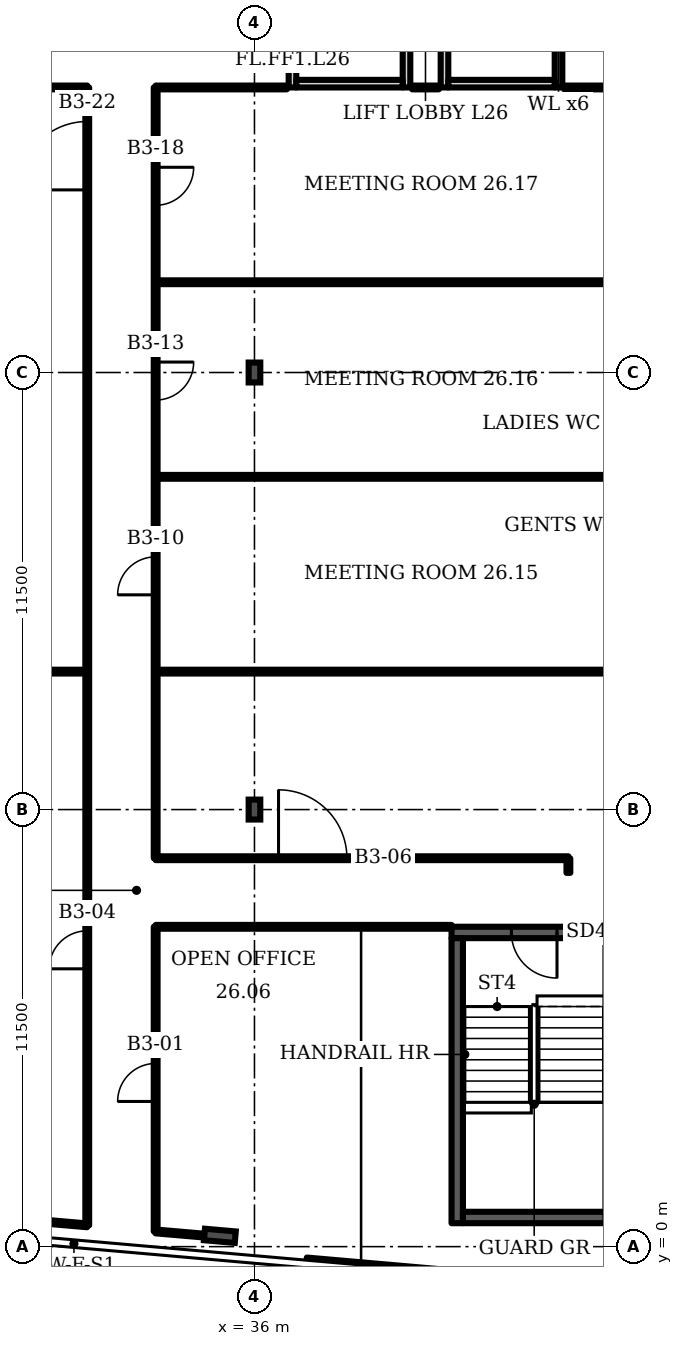
"""IFC4 building model, lengths in metres.
Left out: names, types, materials, properties, quantities, classifications, styles, units other than length and angle.
Written with IfcOpenShell. Run it as: python <this file> out.ifc"""

import sys

from ifc_helpers import new_model, si_unit, direction, frame, frame_2d, origin, origin_2d, place, context, subcontext, project, spatial, rectangle, i_section, extrude, element, fill, save


model = new_model("IFC4")
c1 = context("Model", 3, precision=1e-05, world=origin(), true_north=direction((0.0, 1.0)))
c2 = subcontext(c1, "Body", "Model", "MODEL_VIEW")
j1 = project(units=[si_unit("LENGTHUNIT", "METRE"), si_unit("PLANEANGLEUNIT", "RADIAN")], contexts=[c1])
p1 = place(None, origin())
s1 = spatial("IfcSite", under=j1, at=p1, CompositionType="ELEMENT")
p2 = place(p1, origin())
s2 = spatial("IfcBuilding", under=s1, at=p2, CompositionType="ELEMENT")
p3 = place(p2, frame((0.0, 0.0, 114.7)))
s3 = spatial("IfcBuildingStorey", under=s2, at=p3, CompositionType="ELEMENT", Elevation=114.7)
p4 = place(p3, frame((35.089, 0.285, 0.0), z_axis=(0.0, 0.0, 1.0), x_axis=(-0.087156, -0.996198, 0.0)))
e1 = element("IfcColumn", 1, at=p4, inside=s3, PredefinedType="COLUMN", context=c2, shape_type="SweptSolid", body=[
    extrude(i_section(OverallWidth=0.303, OverallDepth=0.814, WebThickness=0.021, FlangeThickness=0.04, FilletRadius=0.03, at=origin_2d()), origin(), (0.0, 0.0, 1.0), 3.6),
])
for number, where, z_axis, x_axis in (
    (2, (36.0, 11.5, 0.0), (0.0, 0.0, 1.0), (1.0, 0.0, 0.0)),
    (3, (36.0, 23.0, 0.0), (0.0, 0.0, 1.0), (1.0, 0.0, 0.0)),
):
    element("IfcColumn", number, at=place(p3, frame(where, z_axis=z_axis, x_axis=x_axis)), inside=s3, PredefinedType="COLUMN", context=c2, shape_type="SweptSolid", body=[
        extrude(i_section(OverallWidth=0.306, OverallDepth=0.524, WebThickness=0.021, FlangeThickness=0.04, FilletRadius=0.027, at=origin_2d()), origin(), (0.0, 0.0, 1.0), 3.6),
    ])
p5 = place(p3, frame((37.363, -0.461, 0.0), z_axis=(0.0, 0.0, 1.0), x_axis=(0.996194, -0.087159, 0.0)))
e4 = element("IfcWall", 4, at=p5, inside=s3, PredefinedType="SOLIDWALL", context=c2, shape_type="SweptSolid", body=[
    extrude(rectangle(XDim=12.199, YDim=0.35, at=frame_2d((6.099, 0.0))), origin(), (0.0, 0.0, 1.0), 1.0),
])
p6 = place(p3, frame((37.0, 30.5, 0.0), z_axis=(0.0, 0.0, 1.0), x_axis=(0.0, 1.0, 0.0)))
e5 = element("IfcWall", 5, at=p6, inside=s3, PredefinedType="PARTITIONING", context=c2, shape_type="SweptSolid", body=[
    extrude(rectangle(XDim=3.5, YDim=0.2, at=frame_2d((1.75, 0.0))), origin(), (0.0, 0.0, 1.0), 3.2),
])
p7 = place(p6, frame((1.2, 0.0, 0.0)))
e6 = element("IfcOpeningElement", 6, at=p7, cuts=e5, PredefinedType="OPENING", context=c2, shape_type="SweptSolid", body=[
    extrude(rectangle(XDim=1.1, YDim=2.1, at=frame_2d((0.55, 1.05))), frame((0.0, 0.11, 0.0), z_axis=(0.0, -1.0, 0.0), x_axis=(1.0, 0.0, 0.0)), (0.0, 0.0, 1.0), 0.22),
])
p8 = place(p3, frame((40.0, 30.5, 0.0), z_axis=(0.0, 0.0, 1.0), x_axis=(0.0, 1.0, 0.0)))
e7 = element("IfcWall", 7, at=p8, inside=s3, PredefinedType="PARTITIONING", context=c2, shape_type="SweptSolid", body=[
    extrude(rectangle(XDim=3.5, YDim=0.2, at=frame_2d((1.75, 0.0))), origin(), (0.0, 0.0, 1.0), 3.2),
])
p9 = place(p3, frame((37.1, 30.6, 0.0), z_axis=(0.0, 0.0, 1.0), x_axis=(1.0, 0.0, 0.0)))
e8 = element("IfcWall", 8, at=p9, inside=s3, PredefinedType="PARTITIONING", context=c2, shape_type="SweptSolid", body=[
    extrude(rectangle(XDim=2.8, YDim=0.2, at=frame_2d((1.4, 0.0))), origin(), (0.0, 0.0, 1.0), 3.2),
])
p10 = place(p3, frame((41.0, 30.5, 0.0), z_axis=(0.0, 0.0, 1.0), x_axis=(0.0, 1.0, 0.0)))
e9 = element("IfcWall", 9, at=p10, inside=s3, PredefinedType="PARTITIONING", context=c2, shape_type="SweptSolid", body=[
    extrude(rectangle(XDim=3.5, YDim=0.2, at=frame_2d((1.75, 0.0))), origin(), (0.0, 0.0, 1.0), 3.2),
])
p11 = place(p3, frame((44.0, 30.5, 0.0), z_axis=(0.0, 0.0, 1.0), x_axis=(0.0, 1.0, 0.0)))
e10 = element("IfcWall", 10, at=p11, inside=s3, PredefinedType="PARTITIONING", context=c2, shape_type="SweptSolid", body=[
    extrude(rectangle(XDim=3.5, YDim=0.2, at=frame_2d((1.75, 0.0))), origin(), (0.0, 0.0, 1.0), 3.2),
])
p12 = place(p11, frame((1.2, 0.0, 0.0)))
e11 = element("IfcOpeningElement", 11, at=p12, cuts=e10, PredefinedType="OPENING", context=c2, shape_type="SweptSolid", body=[
    extrude(rectangle(XDim=1.1, YDim=2.1, at=frame_2d((0.55, 1.05))), frame((0.0, 0.11, 0.0), z_axis=(0.0, -1.0, 0.0), x_axis=(1.0, 0.0, 0.0)), (0.0, 0.0, 1.0), 0.22),
])
p13 = place(p3, frame((41.1, 30.6, 0.0), z_axis=(0.0, 0.0, 1.0), x_axis=(1.0, 0.0, 0.0)))
e12 = element("IfcWall", 12, at=p13, inside=s3, PredefinedType="PARTITIONING", context=c2, shape_type="SweptSolid", body=[
    extrude(rectangle(XDim=2.8, YDim=0.2, at=frame_2d((1.4, 0.0))), origin(), (0.0, 0.0, 1.0), 3.2),
])
p14 = place(p3, frame((41.185, 8.267, 0.0), z_axis=(0.0, 0.0, 1.0), x_axis=(1.0, 0.0, 0.0)))
e13 = element("IfcWall", 13, at=p14, inside=s3, PredefinedType="SHEAR", context=c2, shape_type="SweptSolid", body=[
    extrude(rectangle(XDim=4.35, YDim=0.3, at=frame_2d((2.175, 0.0))), origin(), (0.0, 0.0, 1.0), 3.2),
])
p15 = place(p14, frame((1.575, 0.0, 0.0)))
e14 = element("IfcOpeningElement", 14, at=p15, cuts=e13, PredefinedType="OPENING", context=c2, shape_type="SweptSolid", body=[
    extrude(rectangle(XDim=1.2, YDim=2.1, at=frame_2d((0.6, 1.05))), frame((0.0, 0.16, 0.0), z_axis=(0.0, -1.0, 0.0), x_axis=(1.0, 0.0, 0.0)), (0.0, 0.0, 1.0), 0.32),
])
p16 = place(p3, frame((13.0, 15.13, 0.0), z_axis=(0.0, 0.0, 1.0), x_axis=(1.0, 0.0, 0.0)))
e15 = element("IfcWall", 15, at=p16, inside=s3, PredefinedType="PARTITIONING", context=c2, shape_type="SweptSolid", body=[
    extrude(rectangle(XDim=18.6, YDim=0.1, at=frame_2d((9.3, 0.0))), origin(), (0.0, 0.0, 1.0), 3.2),
])
p17 = place(p3, frame((17.8, 30.5, 0.0), z_axis=(0.0, 0.0, 1.0), x_axis=(1.0, 0.0, 0.0)))
e16 = element("IfcWall", 16, at=p17, inside=s3, PredefinedType="PARTITIONING", context=c2, shape_type="SweptSolid", body=[
    extrude(rectangle(XDim=13.8, YDim=0.1, at=frame_2d((6.9, 0.0))), origin(), (0.0, 0.0, 1.0), 3.2),
])
p18 = place(p3, frame((31.6, 0.56, 0.0), z_axis=(0.0, 0.0, 1.0), x_axis=(0.0, 1.0, 0.0)))
e17 = element("IfcWall", 17, at=p18, inside=s3, PredefinedType="PARTITIONING", context=c2, shape_type="SweptSolid", body=[
    extrude(rectangle(XDim=29.94, YDim=0.1, at=frame_2d((14.97, 0.0))), origin(), (0.0, 0.0, 1.0), 3.2),
])
p19 = place(p18, frame((6.75, 0.0, 0.0)))
e18 = element("IfcOpeningElement", 18, at=p19, cuts=e17, PredefinedType="OPENING", context=c2, shape_type="SweptSolid", body=[
    extrude(rectangle(XDim=1.0, YDim=2.1, at=frame_2d((0.5, 1.05))), frame((0.0, 0.06, 0.0), z_axis=(0.0, -1.0, 0.0), x_axis=(1.0, 0.0, 0.0)), (0.0, 0.0, 1.0), 0.12),
])
p20 = place(p18, frame((27.245, 0.0, 0.0)))
e19 = element("IfcOpeningElement", 19, at=p20, cuts=e17, PredefinedType="OPENING", context=c2, shape_type="SweptSolid", body=[
    extrude(rectangle(XDim=1.8, YDim=2.1, at=frame_2d((0.9, 1.05))), frame((0.0, 0.06, 0.0), z_axis=(0.0, -1.0, 0.0), x_axis=(1.0, 0.0, 0.0)), (0.0, 0.0, 1.0), 0.12),
])
p21 = place(p3, frame((31.6, 0.56, 0.0), z_axis=(0.0, 0.0, 1.0), x_axis=(-0.996229, 0.086796, 0.0)))
e20 = element("IfcWall", 20, at=p21, inside=s3, PredefinedType="PARTITIONING", context=c2, shape_type="SweptSolid", body=[
    extrude(rectangle(XDim=6.911, YDim=0.1, at=frame_2d((3.456, 0.0))), origin(), (0.0, 0.0, 1.0), 2.58),
])
p22 = place(p3, frame((33.4, 0.4, 0.0), z_axis=(0.0, 0.0, 1.0), x_axis=(0.0, 1.0, 0.0)))
e21 = element("IfcWall", 21, at=p22, inside=s3, PredefinedType="PARTITIONING", context=c2, shape_type="SweptSolid", body=[
    extrude(rectangle(XDim=8.015, YDim=0.1, at=frame_2d((4.008, 0.0))), origin(), (0.0, 0.0, 1.0), 3.2),
])
p23 = place(p22, frame((3.42, 0.0, 0.0)))
e22 = element("IfcOpeningElement", 22, at=p23, cuts=e21, PredefinedType="OPENING", context=c2, shape_type="SweptSolid", body=[
    extrude(rectangle(XDim=1.0, YDim=2.1, at=frame_2d((0.5, 1.05))), frame((0.0, 0.06, 0.0), z_axis=(0.0, -1.0, 0.0), x_axis=(1.0, 0.0, 0.0)), (0.0, 0.0, 1.0), 0.12),
])
p24 = place(p3, frame((33.4, 8.415, 0.0), z_axis=(0.0, 0.0, 1.0), x_axis=(1.0, 0.0, 0.0)))
e23 = element("IfcWall", 23, at=p24, inside=s3, PredefinedType="PARTITIONING", context=c2, shape_type="SweptSolid", body=[
    extrude(rectangle(XDim=7.785, YDim=0.1, at=frame_2d((3.893, 0.0))), origin(), (0.0, 0.0, 1.0), 3.2),
])
p25 = place(p3, frame((33.4, 10.22, 0.0), z_axis=(0.0, 0.0, 1.0), x_axis=(0.0, 1.0, 0.0)))
e24 = element("IfcWall", 24, at=p25, inside=s3, PredefinedType="PARTITIONING", context=c2, shape_type="SweptSolid", body=[
    extrude(rectangle(XDim=20.28, YDim=0.1, at=frame_2d((10.14, 0.0))), origin(), (0.0, 0.0, 1.0), 3.2),
])
p26 = place(p25, frame((6.93, 0.0, 0.0)))
e25 = element("IfcOpeningElement", 25, at=p26, cuts=e24, PredefinedType="OPENING", context=c2, shape_type="SweptSolid", body=[
    extrude(rectangle(XDim=1.0, YDim=2.1, at=frame_2d((0.5, 1.05))), frame((0.0, 0.06, 0.0), z_axis=(0.0, -1.0, 0.0), x_axis=(1.0, 0.0, 0.0)), (0.0, 0.0, 1.0), 0.12),
])
p27 = place(p25, frame((12.055, 0.0, 0.0)))
e26 = element("IfcOpeningElement", 26, at=p27, cuts=e24, PredefinedType="OPENING", context=c2, shape_type="SweptSolid", body=[
    extrude(rectangle(XDim=1.0, YDim=2.1, at=frame_2d((0.5, 1.05))), frame((0.0, 0.06, 0.0), z_axis=(0.0, -1.0, 0.0), x_axis=(1.0, 0.0, 0.0)), (0.0, 0.0, 1.0), 0.12),
])
p28 = place(p25, frame((17.18, 0.0, 0.0)))
e27 = element("IfcOpeningElement", 27, at=p28, cuts=e24, PredefinedType="OPENING", context=c2, shape_type="SweptSolid", body=[
    extrude(rectangle(XDim=1.0, YDim=2.1, at=frame_2d((0.5, 1.05))), frame((0.0, 0.06, 0.0), z_axis=(0.0, -1.0, 0.0), x_axis=(1.0, 0.0, 0.0)), (0.0, 0.0, 1.0), 0.12),
])
p29 = place(p3, frame((33.4, 10.22, 0.0), z_axis=(0.0, 0.0, 1.0), x_axis=(1.0, 0.0, 0.0)))
e28 = element("IfcWall", 28, at=p29, inside=s3, PredefinedType="PARTITIONING", context=c2, shape_type="SweptSolid", body=[
    extrude(rectangle(XDim=10.86, YDim=0.1, at=frame_2d((5.43, 0.0))), origin(), (0.0, 0.0, 1.0), 3.2),
])
p30 = place(p29, frame((3.233, 0.0, 0.0)))
e29 = element("IfcOpeningElement", 29, at=p30, cuts=e28, PredefinedType="OPENING", context=c2, shape_type="SweptSolid", body=[
    extrude(rectangle(XDim=1.8, YDim=2.1, at=frame_2d((0.9, 1.05))), frame((0.0, 0.06, 0.0), z_axis=(0.0, -1.0, 0.0), x_axis=(1.0, 0.0, 0.0)), (0.0, 0.0, 1.0), 0.12),
])
p31 = place(p3, frame((33.4, 15.13, 0.0), z_axis=(0.0, 0.0, 1.0), x_axis=(1.0, 0.0, 0.0)))
e30 = element("IfcWall", 30, at=p31, inside=s3, PredefinedType="PARTITIONING", context=c2, shape_type="SweptSolid", body=[
    extrude(rectangle(XDim=24.2, YDim=0.1, at=frame_2d((12.1, 0.0))), origin(), (0.0, 0.0, 1.0), 3.2),
])
for number, where, z_axis, x_axis in (
    (31, (33.4, 20.255, 0.0), (0.0, 0.0, 1.0), (1.0, 0.0, 0.0)),
    (32, (33.4, 25.375, 0.0), (0.0, 0.0, 1.0), (1.0, 0.0, 0.0)),
):
    element("IfcWall", number, at=place(p3, frame(where, z_axis=z_axis, x_axis=x_axis)), inside=s3, PredefinedType="PARTITIONING", context=c2, shape_type="SweptSolid", body=[
        extrude(rectangle(XDim=13.975, YDim=0.1, at=frame_2d((6.988, 0.0))), origin(), (0.0, 0.0, 1.0), 3.2),
    ])
p32 = place(p3, frame((33.4, 30.5, 0.0), z_axis=(0.0, 0.0, 1.0), x_axis=(1.0, 0.0, 0.0)))
e33 = element("IfcWall", 33, at=p32, inside=s3, PredefinedType="PARTITIONING", context=c2, shape_type="SweptSolid", body=[
    extrude(rectangle(XDim=3.45, YDim=0.1, at=frame_2d((1.725, 0.0))), origin(), (0.0, 0.0, 1.0), 3.2),
])
p33 = place(p3, frame((35.085, 0.255, 0.0), z_axis=(0.0, 0.0, 1.0), x_axis=(-0.996316, 0.085745, 0.0)))
e34 = element("IfcWall", 34, at=p33, inside=s3, PredefinedType="PARTITIONING", context=c2, shape_type="SweptSolid", body=[
    extrude(rectangle(XDim=1.691, YDim=0.1, at=frame_2d((0.846, 0.0))), origin(), (0.0, 0.0, 1.0), 2.58),
])
p34 = place(p3, frame((44.26, 9.835, 0.0), z_axis=(0.0, 0.0, 1.0), x_axis=(0.0, 1.0, 0.0)))
e35 = element("IfcWall", 35, at=p34, inside=s3, PredefinedType="PARTITIONING", context=c2, shape_type="SweptSolid", body=[
    extrude(rectangle(XDim=0.38, YDim=0.1, at=frame_2d((0.19, 0.0))), origin(), (0.0, 0.0, 1.0), 3.2),
])
p35 = place(p3, frame((40.15, 30.5, 0.0), z_axis=(0.0, 0.0, 1.0), x_axis=(1.0, 0.0, 0.0)))
e36 = element("IfcWall", 36, at=p35, inside=s3, PredefinedType="PARTITIONING", context=c2, shape_type="SweptSolid", body=[
    extrude(rectangle(XDim=0.7, YDim=0.1, at=frame_2d((0.35, 0.0))), origin(), (0.0, 0.0, 1.0), 3.2),
])
p36 = place(p3, frame((44.15, 30.5, 0.0), z_axis=(0.0, 0.0, 1.0), x_axis=(1.0, 0.0, 0.0)))
e37 = element("IfcWall", 37, at=p36, inside=s3, PredefinedType="PARTITIONING", context=c2, shape_type="SweptSolid", body=[
    extrude(rectangle(XDim=13.45, YDim=0.1, at=frame_2d((6.725, 0.0))), origin(), (0.0, 0.0, 1.0), 3.2),
])
p37 = place(p3, frame((41.335, 0.617, 0.0), z_axis=(0.0, 0.0, 1.0), x_axis=(0.0, 1.0, 0.0)))
e38 = element("IfcWall", 38, at=p37, inside=s3, PredefinedType="SHEAR", context=c2, shape_type="SweptSolid", body=[
    extrude(rectangle(XDim=7.5, YDim=0.3, at=frame_2d((3.75, 0.0))), origin(), (0.0, 0.0, 1.0), 3.2),
])
p38 = place(p3, frame((41.485, 0.767, 0.0), z_axis=(0.0, 0.0, 1.0), x_axis=(1.0, 0.0, 0.0)))
e39 = element("IfcWall", 39, at=p38, inside=s3, PredefinedType="SHEAR", context=c2, shape_type="SweptSolid", body=[
    extrude(rectangle(XDim=3.75, YDim=0.3, at=frame_2d((1.875, 0.0))), origin(), (0.0, 0.0, 1.0), 3.2),
])
p39 = place(p15, origin())
e40 = element("IfcDoor", 40, at=p39, inside=s3, OperationType="SINGLE_SWING_RIGHT", PredefinedType="DOOR", context=c2, shape_type="SweptSolid", body=[
    extrude(rectangle(XDim=1.2, YDim=2.1, at=frame_2d((0.6, 1.05))), frame((0.0, 0.025, 0.0), z_axis=(0.0, -1.0, 0.0), x_axis=(1.0, 0.0, 0.0)), (0.0, 0.0, 1.0), 0.05),
])
fill(e14, e40)
p40 = place(p23, origin())
e41 = element("IfcDoor", 41, at=p40, inside=s3, OperationType="SINGLE_SWING_LEFT", PredefinedType="DOOR", context=c2, shape_type="SweptSolid", body=[
    extrude(rectangle(XDim=1.0, YDim=2.1, at=frame_2d((0.5, 1.05))), frame((0.0, 0.025, 0.0), z_axis=(0.0, -1.0, 0.0), x_axis=(1.0, 0.0, 0.0)), (0.0, 0.0, 1.0), 0.05),
])
fill(e22, e41)
p41 = place(p19, origin())
e42 = element("IfcDoor", 42, at=p41, inside=s3, OperationType="SINGLE_SWING_LEFT", PredefinedType="DOOR", context=c2, shape_type="SweptSolid", body=[
    extrude(rectangle(XDim=1.0, YDim=2.1, at=frame_2d((0.5, 1.05))), frame((0.0, 0.025, 0.0), z_axis=(0.0, -1.0, 0.0), x_axis=(1.0, 0.0, 0.0)), (0.0, 0.0, 1.0), 0.05),
])
fill(e18, e42)
p42 = place(p30, origin())
e43 = element("IfcDoor", 43, at=p42, inside=s3, OperationType="DOUBLE_DOOR_SINGLE_SWING", PredefinedType="DOOR", context=c2, shape_type="SweptSolid", body=[
    extrude(rectangle(XDim=1.8, YDim=2.1, at=frame_2d((0.9, 1.05))), frame((0.0, 0.025, 0.0), z_axis=(0.0, -1.0, 0.0), x_axis=(1.0, 0.0, 0.0)), (0.0, 0.0, 1.0), 0.05),
])
fill(e29, e43)
p43 = place(p26, origin())
e44 = element("IfcDoor", 44, at=p43, inside=s3, OperationType="SINGLE_SWING_LEFT", PredefinedType="DOOR", context=c2, shape_type="SweptSolid", body=[
    extrude(rectangle(XDim=1.0, YDim=2.1, at=frame_2d((0.5, 1.05))), frame((0.0, 0.025, 0.0), z_axis=(0.0, -1.0, 0.0), x_axis=(1.0, 0.0, 0.0)), (0.0, 0.0, 1.0), 0.05),
])
fill(e25, e44)
p44 = place(p27, origin())
e45 = element("IfcDoor", 45, at=p44, inside=s3, OperationType="SINGLE_SWING_RIGHT", PredefinedType="DOOR", context=c2, shape_type="SweptSolid", body=[
    extrude(rectangle(XDim=1.0, YDim=2.1, at=frame_2d((0.5, 1.05))), frame((0.0, 0.025, 0.0), z_axis=(0.0, -1.0, 0.0), x_axis=(1.0, 0.0, 0.0)), (0.0, 0.0, 1.0), 0.05),
])
fill(e26, e45)
p45 = place(p28, origin())
e46 = element("IfcDoor", 46, at=p45, inside=s3, OperationType="SINGLE_SWING_RIGHT", PredefinedType="DOOR", context=c2, shape_type="SweptSolid", body=[
    extrude(rectangle(XDim=1.0, YDim=2.1, at=frame_2d((0.5, 1.05))), frame((0.0, 0.025, 0.0), z_axis=(0.0, -1.0, 0.0), x_axis=(1.0, 0.0, 0.0)), (0.0, 0.0, 1.0), 0.05),
])
fill(e27, e46)
p46 = place(p20, origin())
e47 = element("IfcDoor", 47, at=p46, inside=s3, OperationType="DOUBLE_DOOR_SINGLE_SWING", PredefinedType="DOOR", context=c2, shape_type="SweptSolid", body=[
    extrude(rectangle(XDim=1.8, YDim=2.1, at=frame_2d((0.9, 1.05))), frame((0.0, 0.025, 0.0), z_axis=(0.0, -1.0, 0.0), x_axis=(1.0, 0.0, 0.0)), (0.0, 0.0, 1.0), 0.05),
])
fill(e19, e47)
save(model, sys.argv[1])
